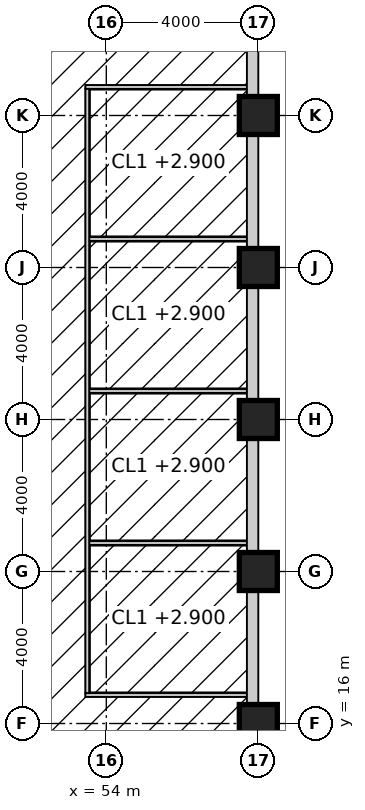
"""IFC4 building model, lengths in metres.
Left out: names, types, materials, properties, quantities, classifications, styles, units other than length and angle.
Written with IfcOpenShell. Run it as: python <this file> out.ifc"""

import sys

from ifc_helpers import new_model, si_unit, direction, frame, frame_2d, origin, origin_2d, place, context, subcontext, project, spatial, rectangle, hollow_rectangle, extrude, element, fill, save


model = new_model("IFC4")
c1 = context("Model", 3, precision=1e-05, world=origin(), true_north=direction((0.0, 1.0)))
c2 = subcontext(c1, "Body", "Model", "MODEL_VIEW")
j1 = project(units=[si_unit("LENGTHUNIT", "METRE"), si_unit("PLANEANGLEUNIT", "RADIAN")], contexts=[c1])
p1 = place(None, origin())
s1 = spatial("IfcSite", under=j1, at=p1, CompositionType="ELEMENT")
p2 = place(p1, origin())
s2 = spatial("IfcBuilding", under=s1, at=p2, CompositionType="ELEMENT")
p3 = place(p2, frame((0.0, 0.0, 81.4)))
s3 = spatial("IfcBuildingStorey", under=s2, at=p3, CompositionType="ELEMENT", Elevation=81.4)
for number, where, z_axis, x_axis in (
    (1, (58.0, 16.0, 0.0), (0.0, 0.0, 1.0), (1.0, 0.0, 0.0)),
    (2, (58.0, 20.0, 0.0), (0.0, 0.0, 1.0), (1.0, 0.0, 0.0)),
    (3, (58.0, 24.0, 0.0), (0.0, 0.0, 1.0), (1.0, 0.0, 0.0)),
    (4, (58.0, 28.0, 0.0), (0.0, 0.0, 1.0), (1.0, 0.0, 0.0)),
    (5, (58.0, 32.0, 0.0), (0.0, 0.0, 1.0), (1.0, 0.0, 0.0)),
):
    element("IfcColumn", number, at=place(p3, frame(where, z_axis=z_axis, x_axis=x_axis)), inside=s3, PredefinedType="COLUMN", context=c2, shape_type="SweptSolid", body=[
        extrude(hollow_rectangle(XDim=1.0, YDim=1.0, WallThickness=0.1, at=origin_2d()), origin(), (0.0, 0.0, 1.0), 4.0),
    ])
p4 = place(p3, frame((53.45, 16.75, 0.0), z_axis=(0.0, 0.0, 1.0), x_axis=(1.0, 0.0, 0.0)))
e6 = element("IfcWall", 6, at=p4, inside=s3, PredefinedType="PARTITIONING", context=c2, shape_type="SweptSolid", body=[
    extrude(rectangle(XDim=4.25, YDim=0.1, at=frame_2d((2.125, 0.0))), origin(), (0.0, 0.0, 1.0), 3.85),
])
for number, where, z_axis, x_axis in (
    (7, (53.55, 20.75, 0.0), (0.0, 0.0, 1.0), (1.0, 0.0, 0.0)),
    (8, (53.55, 24.75, 0.0), (0.0, 0.0, 1.0), (1.0, 0.0, 0.0)),
    (9, (53.55, 28.75, 0.0), (0.0, 0.0, 1.0), (1.0, 0.0, 0.0)),
):
    element("IfcWall", number, at=place(p3, frame(where, z_axis=z_axis, x_axis=x_axis)), inside=s3, PredefinedType="PARTITIONING", context=c2, shape_type="SweptSolid", body=[
        extrude(rectangle(XDim=4.15, YDim=0.1, at=frame_2d((2.075, 0.0))), origin(), (0.0, 0.0, 1.0), 3.85),
    ])
p5 = place(p3, frame((53.45, 32.75, 0.0), z_axis=(0.0, 0.0, 1.0), x_axis=(1.0, 0.0, 0.0)))
e10 = element("IfcWall", 10, at=p5, inside=s3, PredefinedType="PARTITIONING", context=c2, shape_type="SweptSolid", body=[
    extrude(rectangle(XDim=4.25, YDim=0.1, at=frame_2d((2.125, 0.0))), origin(), (0.0, 0.0, 1.0), 3.85),
])
p6 = place(p3, frame((53.5, 16.8, 0.0), z_axis=(0.0, 0.0, 1.0), x_axis=(0.0, 1.0, 0.0)))
e11 = element("IfcWall", 11, at=p6, inside=s3, PredefinedType="PARTITIONING", context=c2, shape_type="SweptSolid", body=[
    extrude(rectangle(XDim=15.9, YDim=0.1, at=frame_2d((7.95, 0.0))), origin(), (0.0, 0.0, 1.0), 3.85),
])
p7 = place(p6, frame((1.45, 0.0, 0.0)))
e12 = element("IfcOpeningElement", 12, at=p7, cuts=e11, PredefinedType="OPENING", context=c2, shape_type="SweptSolid", body=[
    extrude(rectangle(XDim=1.0, YDim=2.2, at=frame_2d((0.5, 1.1))), frame((0.0, 0.06, 0.0), z_axis=(0.0, -1.0, 0.0), x_axis=(1.0, 0.0, 0.0)), (0.0, 0.0, 1.0), 0.12),
])
p8 = place(p6, frame((5.45, 0.0, 0.0)))
e13 = element("IfcOpeningElement", 13, at=p8, cuts=e11, PredefinedType="OPENING", context=c2, shape_type="SweptSolid", body=[
    extrude(rectangle(XDim=1.0, YDim=2.2, at=frame_2d((0.5, 1.1))), frame((0.0, 0.06, 0.0), z_axis=(0.0, -1.0, 0.0), x_axis=(1.0, 0.0, 0.0)), (0.0, 0.0, 1.0), 0.12),
])
p9 = place(p6, frame((9.45, 0.0, 0.0)))
e14 = element("IfcOpeningElement", 14, at=p9, cuts=e11, PredefinedType="OPENING", context=c2, shape_type="SweptSolid", body=[
    extrude(rectangle(XDim=1.0, YDim=2.2, at=frame_2d((0.5, 1.1))), frame((0.0, 0.06, 0.0), z_axis=(0.0, -1.0, 0.0), x_axis=(1.0, 0.0, 0.0)), (0.0, 0.0, 1.0), 0.12),
])
p10 = place(p6, frame((13.45, 0.0, 0.0)))
e15 = element("IfcOpeningElement", 15, at=p10, cuts=e11, PredefinedType="OPENING", context=c2, shape_type="SweptSolid", body=[
    extrude(rectangle(XDim=1.0, YDim=2.2, at=frame_2d((0.5, 1.1))), frame((0.0, 0.06, 0.0), z_axis=(0.0, -1.0, 0.0), x_axis=(1.0, 0.0, 0.0)), (0.0, 0.0, 1.0), 0.12),
])
p11 = place(p3, frame((57.85, 16.5, 0.0), z_axis=(0.0, 0.0, 1.0), x_axis=(0.0, 1.0, 0.0)))
e16 = element("IfcWall", 16, at=p11, inside=s3, PredefinedType="ELEMENTEDWALL", context=c2, shape_type="SweptSolid", body=[
    extrude(rectangle(XDim=3.0, YDim=0.3, at=frame_2d((1.5, 0.0))), origin(), (0.0, 0.0, 1.0), 2.85),
])
p12 = place(p11, frame((0.5, 0.0, 0.8)))
e17 = element("IfcOpeningElement", 17, at=p12, cuts=e16, PredefinedType="OPENING", context=c2, shape_type="SweptSolid", body=[
    extrude(rectangle(XDim=2.0, YDim=2.0, at=frame_2d((1.0, 1.0))), frame((0.0, 0.16, 0.0), z_axis=(0.0, -1.0, 0.0), x_axis=(1.0, 0.0, 0.0)), (0.0, 0.0, 1.0), 0.32),
])
p13 = place(p3, frame((57.85, 20.5, 0.0), z_axis=(0.0, 0.0, 1.0), x_axis=(0.0, 1.0, 0.0)))
e18 = element("IfcWall", 18, at=p13, inside=s3, PredefinedType="ELEMENTEDWALL", context=c2, shape_type="SweptSolid", body=[
    extrude(rectangle(XDim=3.0, YDim=0.3, at=frame_2d((1.5, 0.0))), origin(), (0.0, 0.0, 1.0), 2.85),
])
p14 = place(p13, frame((0.5, 0.0, 0.8)))
e19 = element("IfcOpeningElement", 19, at=p14, cuts=e18, PredefinedType="OPENING", context=c2, shape_type="SweptSolid", body=[
    extrude(rectangle(XDim=2.0, YDim=2.0, at=frame_2d((1.0, 1.0))), frame((0.0, 0.16, 0.0), z_axis=(0.0, -1.0, 0.0), x_axis=(1.0, 0.0, 0.0)), (0.0, 0.0, 1.0), 0.32),
])
p15 = place(p3, frame((57.85, 24.5, 0.0), z_axis=(0.0, 0.0, 1.0), x_axis=(0.0, 1.0, 0.0)))
e20 = element("IfcWall", 20, at=p15, inside=s3, PredefinedType="ELEMENTEDWALL", context=c2, shape_type="SweptSolid", body=[
    extrude(rectangle(XDim=3.0, YDim=0.3, at=frame_2d((1.5, 0.0))), origin(), (0.0, 0.0, 1.0), 2.85),
])
p16 = place(p15, frame((0.5, 0.0, 0.8)))
e21 = element("IfcOpeningElement", 21, at=p16, cuts=e20, PredefinedType="OPENING", context=c2, shape_type="SweptSolid", body=[
    extrude(rectangle(XDim=2.0, YDim=2.0, at=frame_2d((1.0, 1.0))), frame((0.0, 0.16, 0.0), z_axis=(0.0, -1.0, 0.0), x_axis=(1.0, 0.0, 0.0)), (0.0, 0.0, 1.0), 0.32),
])
p17 = place(p3, frame((57.85, 28.5, 0.0), z_axis=(0.0, 0.0, 1.0), x_axis=(0.0, 1.0, 0.0)))
e22 = element("IfcWall", 22, at=p17, inside=s3, PredefinedType="ELEMENTEDWALL", context=c2, shape_type="SweptSolid", body=[
    extrude(rectangle(XDim=3.0, YDim=0.3, at=frame_2d((1.5, 0.0))), origin(), (0.0, 0.0, 1.0), 2.85),
])
p18 = place(p17, frame((0.5, 0.0, 0.8)))
e23 = element("IfcOpeningElement", 23, at=p18, cuts=e22, PredefinedType="OPENING", context=c2, shape_type="SweptSolid", body=[
    extrude(rectangle(XDim=2.0, YDim=2.0, at=frame_2d((1.0, 1.0))), frame((0.0, 0.16, 0.0), z_axis=(0.0, -1.0, 0.0), x_axis=(1.0, 0.0, 0.0)), (0.0, 0.0, 1.0), 0.32),
])
p19 = place(p3, frame((57.85, 32.5, 0.0), z_axis=(0.0, 0.0, 1.0), x_axis=(0.0, 1.0, 0.0)))
e24 = element("IfcWall", 24, at=p19, inside=s3, PredefinedType="ELEMENTEDWALL", context=c2, shape_type="SweptSolid", body=[
    extrude(rectangle(XDim=3.0, YDim=0.3, at=frame_2d((1.5, 0.0))), origin(), (0.0, 0.0, 1.0), 2.85),
])
p20 = place(p19, frame((0.5, 0.0, 0.8)))
e25 = element("IfcOpeningElement", 25, at=p20, cuts=e24, PredefinedType="OPENING", context=c2, shape_type="SweptSolid", body=[
    extrude(rectangle(XDim=2.0, YDim=2.0, at=frame_2d((1.0, 1.0))), frame((0.0, 0.16, 0.0), z_axis=(0.0, -1.0, 0.0), x_axis=(1.0, 0.0, 0.0)), (0.0, 0.0, 1.0), 0.32),
])
p21 = place(p7, origin())
e26 = element("IfcDoor", 26, at=p21, inside=s3, OperationType="SINGLE_SWING_LEFT", PredefinedType="DOOR", context=c2, shape_type="SweptSolid", body=[
    extrude(rectangle(XDim=1.0, YDim=2.2, at=frame_2d((0.5, 1.1))), frame((0.0, 0.025, 0.0), z_axis=(0.0, -1.0, 0.0), x_axis=(1.0, 0.0, 0.0)), (0.0, 0.0, 1.0), 0.05),
])
fill(e12, e26)
p22 = place(p8, origin())
e27 = element("IfcDoor", 27, at=p22, inside=s3, OperationType="SINGLE_SWING_LEFT", PredefinedType="DOOR", context=c2, shape_type="SweptSolid", body=[
    extrude(rectangle(XDim=1.0, YDim=2.2, at=frame_2d((0.5, 1.1))), frame((0.0, 0.025, 0.0), z_axis=(0.0, -1.0, 0.0), x_axis=(1.0, 0.0, 0.0)), (0.0, 0.0, 1.0), 0.05),
])
fill(e13, e27)
p23 = place(p9, origin())
e28 = element("IfcDoor", 28, at=p23, inside=s3, OperationType="SINGLE_SWING_LEFT", PredefinedType="DOOR", context=c2, shape_type="SweptSolid", body=[
    extrude(rectangle(XDim=1.0, YDim=2.2, at=frame_2d((0.5, 1.1))), frame((0.0, 0.025, 0.0), z_axis=(0.0, -1.0, 0.0), x_axis=(1.0, 0.0, 0.0)), (0.0, 0.0, 1.0), 0.05),
])
fill(e14, e28)
p24 = place(p10, origin())
e29 = element("IfcDoor", 29, at=p24, inside=s3, OperationType="SINGLE_SWING_LEFT", PredefinedType="DOOR", context=c2, shape_type="SweptSolid", body=[
    extrude(rectangle(XDim=1.0, YDim=2.2, at=frame_2d((0.5, 1.1))), frame((0.0, 0.025, 0.0), z_axis=(0.0, -1.0, 0.0), x_axis=(1.0, 0.0, 0.0)), (0.0, 0.0, 1.0), 0.05),
])
fill(e15, e29)
p25 = place(p12, origin())
e30 = element("IfcWindow", 30, at=p25, inside=s3, PartitioningType="SINGLE_PANEL", PredefinedType="WINDOW", context=c2, shape_type="SweptSolid", body=[
    extrude(rectangle(XDim=2.0, YDim=2.0, at=frame_2d((1.0, 1.0))), frame((0.0, 0.03, 0.0), z_axis=(0.0, -1.0, 0.0), x_axis=(1.0, 0.0, 0.0)), (0.0, 0.0, 1.0), 0.06),
])
fill(e17, e30)
p26 = place(p14, origin())
e31 = element("IfcWindow", 31, at=p26, inside=s3, PartitioningType="SINGLE_PANEL", PredefinedType="WINDOW", context=c2, shape_type="SweptSolid", body=[
    extrude(rectangle(XDim=2.0, YDim=2.0, at=frame_2d((1.0, 1.0))), frame((0.0, 0.03, 0.0), z_axis=(0.0, -1.0, 0.0), x_axis=(1.0, 0.0, 0.0)), (0.0, 0.0, 1.0), 0.06),
])
fill(e19, e31)
p27 = place(p16, origin())
e32 = element("IfcWindow", 32, at=p27, inside=s3, PartitioningType="SINGLE_PANEL", PredefinedType="WINDOW", context=c2, shape_type="SweptSolid", body=[
    extrude(rectangle(XDim=2.0, YDim=2.0, at=frame_2d((1.0, 1.0))), frame((0.0, 0.03, 0.0), z_axis=(0.0, -1.0, 0.0), x_axis=(1.0, 0.0, 0.0)), (0.0, 0.0, 1.0), 0.06),
])
fill(e21, e32)
p28 = place(p18, origin())
e33 = element("IfcWindow", 33, at=p28, inside=s3, PartitioningType="SINGLE_PANEL", PredefinedType="WINDOW", context=c2, shape_type="SweptSolid", body=[
    extrude(rectangle(XDim=2.0, YDim=2.0, at=frame_2d((1.0, 1.0))), frame((0.0, 0.03, 0.0), z_axis=(0.0, -1.0, 0.0), x_axis=(1.0, 0.0, 0.0)), (0.0, 0.0, 1.0), 0.06),
])
fill(e23, e33)
p29 = place(p20, origin())
e34 = element("IfcWindow", 34, at=p29, inside=s3, PartitioningType="SINGLE_PANEL", PredefinedType="WINDOW", context=c2, shape_type="SweptSolid", body=[
    extrude(rectangle(XDim=2.0, YDim=2.0, at=frame_2d((1.0, 1.0))), frame((0.0, 0.03, 0.0), z_axis=(0.0, -1.0, 0.0), x_axis=(1.0, 0.0, 0.0)), (0.0, 0.0, 1.0), 0.06),
])
fill(e25, e34)
save(model, sys.argv[1])
